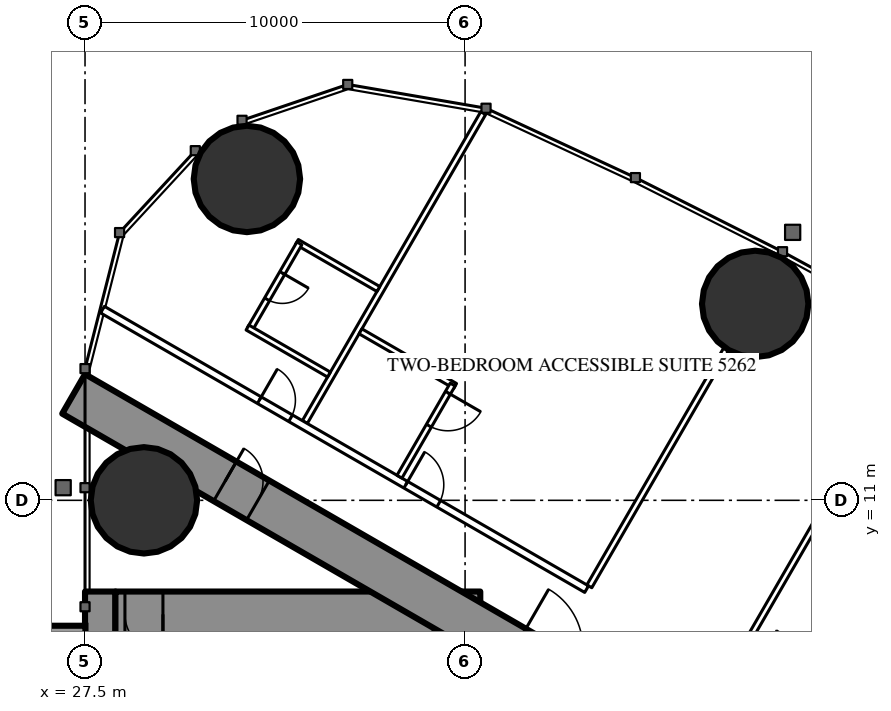
"""IFC4 building model, lengths in metres.
Left out: names, types, materials, properties, quantities, classifications, styles, units other than length and angle.
Written with IfcOpenShell. Run it as: python <this file> out.ifc"""

import sys

from ifc_helpers import new_model, si_unit, direction, frame, frame_2d, origin, origin_2d, place, context, subcontext, project, spatial, rectangle, circle, extrude, element, fill, save


model = new_model("IFC4")
c1 = context("Model", 3, precision=1e-05, world=origin(), true_north=direction((0.0, 1.0)))
c2 = subcontext(c1, "Body", "Model", "MODEL_VIEW")
j1 = project(units=[si_unit("LENGTHUNIT", "METRE"), si_unit("PLANEANGLEUNIT", "RADIAN")], contexts=[c1])
p1 = place(None, origin())
s1 = spatial("IfcSite", under=j1, at=p1, CompositionType="ELEMENT")
p2 = place(p1, origin())
s2 = spatial("IfcBuilding", under=s1, at=p2, CompositionType="ELEMENT")
p3 = place(p2, frame((0.0, 0.0, 194.8)))
s3 = spatial("IfcBuildingStorey", under=s2, at=p3, CompositionType="ELEMENT", Elevation=194.8)
for number, where, z_axis, x_axis in (
    (1, (31.76, 19.456, 0.0), (0.0, 0.0, 1.0), (1.0, 0.0, 0.0)),
    (2, (29.05, 11.0, 0.0), (0.0, 0.0, 1.0), (1.0, 0.0, 0.0)),
    (3, (45.134, 16.168, 0.0), (0.0, 0.0, 1.0), (1.0, 0.0, 0.0)),
):
    element("IfcColumn", number, at=place(p3, frame(where, z_axis=z_axis, x_axis=x_axis)), inside=s3, PredefinedType="COLUMN", context=c2, shape_type="SweptSolid", body=[
        extrude(circle(Radius=1.4, at=origin_2d()), origin(), (0.0, 0.0, 1.0), 3.5),
    ])
p4 = place(p3, frame((27.9, -8.6, 0.0), z_axis=(0.0, 0.0, 1.0), x_axis=(0.0, 1.0, 0.0)))
e4 = element("IfcWall", 4, at=p4, inside=s3, PredefinedType="SHEAR", context=c2, shape_type="SweptSolid", body=[
    extrude(rectangle(XDim=17.2, YDim=0.8, at=frame_2d((8.6, 0.0))), origin(), (0.0, 0.0, 1.0), 3.5),
])
p5 = place(p4, frame((2.45, 0.0, 0.6)))
e5 = element("IfcOpeningElement", 5, at=p5, cuts=e4, PredefinedType="OPENING", context=c2, shape_type="SweptSolid", body=[
    extrude(rectangle(XDim=0.6, YDim=2.1, at=frame_2d((0.3, 1.05))), frame((0.0, 0.41, 0.0), z_axis=(0.0, -1.0, 0.0), x_axis=(1.0, 0.0, 0.0)), (0.0, 0.0, 1.0), 0.82),
])
p6 = place(p4, frame((14.15, 0.0, 0.6)))
e6 = element("IfcOpeningElement", 6, at=p6, cuts=e4, PredefinedType="OPENING", context=c2, shape_type="SweptSolid", body=[
    extrude(rectangle(XDim=0.6, YDim=2.1, at=frame_2d((0.3, 1.05))), frame((0.0, 0.41, 0.0), z_axis=(0.0, -1.0, 0.0), x_axis=(1.0, 0.0, 0.0)), (0.0, 0.0, 1.0), 0.82),
])
p7 = place(p3, frame((37.3, -8.6, 0.0), z_axis=(0.0, 0.0, 1.0), x_axis=(0.0, 1.0, 0.0)))
e7 = element("IfcWall", 7, at=p7, inside=s3, PredefinedType="SHEAR", context=c2, shape_type="SweptSolid", body=[
    extrude(rectangle(XDim=17.2, YDim=1.2, at=frame_2d((8.6, 0.0))), origin(), (0.0, 0.0, 1.0), 3.5),
])
p8 = place(p7, frame((7.7, 0.0, 0.0)))
e8 = element("IfcOpeningElement", 8, at=p8, cuts=e7, PredefinedType="OPENING", context=c2, shape_type="SweptSolid", body=[
    extrude(rectangle(XDim=1.8, YDim=2.2, at=frame_2d((0.9, 1.1))), frame((0.0, 0.61, 0.0), z_axis=(0.0, -1.0, 0.0), x_axis=(1.0, 0.0, 0.0)), (0.0, 0.0, 1.0), 1.22),
])
p9 = place(p3, frame((28.3, 8.0, 0.0), z_axis=(0.0, 0.0, 1.0), x_axis=(1.0, 0.0, 0.0)))
e9 = element("IfcWall", 9, at=p9, inside=s3, PredefinedType="SHEAR", context=c2, shape_type="SweptSolid", body=[
    extrude(rectangle(XDim=8.4, YDim=1.2, at=frame_2d((4.2, 0.0))), origin(), (0.0, 0.0, 1.0), 3.5),
])
p10 = place(p9, frame((0.25, 0.0, 0.0)))
e10 = element("IfcOpeningElement", 10, at=p10, cuts=e9, PredefinedType="OPENING", context=c2, shape_type="SweptSolid", body=[
    extrude(rectangle(XDim=1.0, YDim=2.2, at=frame_2d((0.5, 1.1))), frame((0.0, 0.61, 0.0), z_axis=(0.0, -1.0, 0.0), x_axis=(1.0, 0.0, 0.0)), (0.0, 0.0, 1.0), 1.22),
])
p11 = place(p3, frame((27.2, 13.8, 0.0), z_axis=(0.0, 0.0, 1.0), x_axis=(0.866024515034, -0.500001539357, 0.0)))
e11 = element("IfcWall", 11, at=p11, inside=s3, PredefinedType="SHEAR", context=c2, shape_type="SweptSolid", body=[
    extrude(rectangle(XDim=26.907, YDim=1.2, at=frame_2d((13.454, 0.0))), origin(), (0.0, 0.0, 1.0), 3.5),
])
p12 = place(p11, frame((4.6, 0.0, 0.0)))
e12 = element("IfcOpeningElement", 12, at=p12, cuts=e11, PredefinedType="OPENING", context=c2, shape_type="SweptSolid", body=[
    extrude(rectangle(XDim=1.0, YDim=2.2, at=frame_2d((0.5, 1.1))), frame((0.0, 0.61, 0.0), z_axis=(0.0, -1.0, 0.0), x_axis=(1.0, 0.0, 0.0)), (0.0, 0.0, 1.0), 1.22),
])
p13 = place(p11, frame((13.395, 0.0, 0.0)))
e13 = element("IfcOpeningElement", 13, at=p13, cuts=e11, PredefinedType="OPENING", context=c2, shape_type="SweptSolid", body=[
    extrude(rectangle(XDim=1.8, YDim=2.2, at=frame_2d((0.9, 1.1))), frame((0.0, 0.61, 0.0), z_axis=(0.0, -1.0, 0.0), x_axis=(1.0, 0.0, 0.0)), (0.0, 0.0, 1.0), 1.22),
])
p14 = place(p3, frame((33.284, 13.059, 0.0), z_axis=(0.0, 0.0, 1.0), x_axis=(0.499985904184, 0.866033541855, 0.0)))
e14 = element("IfcWall", 14, at=p14, inside=s3, PredefinedType="PARTITIONING", context=c2, shape_type="SweptSolid", body=[
    extrude(rectangle(XDim=9.385, YDim=0.15, at=frame_2d((4.693, 0.0))), origin(), (0.0, 0.0, 1.0), 3.25),
])
p15 = place(p3, frame((40.769, 8.737, 0.0), z_axis=(0.0, 0.0, 1.0), x_axis=(0.500013115284, 0.866017831539, 0.0)))
e15 = element("IfcWall", 15, at=p15, inside=s3, PredefinedType="PARTITIONING", context=c2, shape_type="SweptSolid", body=[
    extrude(rectangle(XDim=7.198, YDim=0.15, at=frame_2d((3.599, 0.0))), origin(), (0.0, 0.0, 1.0), 2.3),
])
p16 = place(p3, frame((44.521, 6.571, 0.0), z_axis=(0.0, 0.0, 1.0), x_axis=(0.500020376429, 0.866013639128, 0.0)))
e16 = element("IfcWall", 16, at=p16, inside=s3, PredefinedType="PARTITIONING", context=c2, shape_type="SweptSolid", body=[
    extrude(rectangle(XDim=7.306, YDim=0.15, at=frame_2d((3.653, 0.0))), origin(), (0.0, 0.0, 1.0), 2.3),
])
p17 = place(p3, frame((27.959, 16.017, 0.0), z_axis=(0.0, 0.0, 1.0), x_axis=(0.866024165033, -0.500002145574, 0.0)))
e17 = element("IfcWall", 17, at=p17, inside=s3, PredefinedType="PARTITIONING", context=c2, shape_type="SweptSolid", body=[
    extrude(rectangle(XDim=14.709, YDim=0.2, at=frame_2d((7.354, 0.0))), origin(), (0.0, 0.0, 1.0), 3.25),
])
p18 = place(p17, frame((9.215, 0.0, 0.0)))
e18 = element("IfcOpeningElement", 18, at=p18, cuts=e17, PredefinedType="OPENING", context=c2, shape_type="SweptSolid", body=[
    extrude(rectangle(XDim=1.0, YDim=2.2, at=frame_2d((0.5, 1.1))), frame((0.0, 0.11, 0.0), z_axis=(0.0, -1.0, 0.0), x_axis=(1.0, 0.0, 0.0)), (0.0, 0.0, 1.0), 0.22),
])
p19 = place(p17, frame((4.765, 0.0, 0.0)))
e19 = element("IfcOpeningElement", 19, at=p19, cuts=e17, PredefinedType="OPENING", context=c2, shape_type="SweptSolid", body=[
    extrude(rectangle(XDim=0.95, YDim=2.2, at=frame_2d((0.475, 1.1))), frame((0.0, 0.11, 0.0), z_axis=(0.0, -1.0, 0.0), x_axis=(1.0, 0.0, 0.0)), (0.0, 0.0, 1.0), 0.22),
])
p20 = place(p3, frame((34.749, 15.446, 0.0), z_axis=(0.0, 0.0, 1.0), x_axis=(0.866018712932, -0.500011588718, 0.0)))
e20 = element("IfcWall", 20, at=p20, inside=s3, PredefinedType="PARTITIONING", context=c2, shape_type="SweptSolid", body=[
    extrude(rectangle(XDim=2.875, YDim=0.15, at=frame_2d((1.438, 0.0))), origin(), (0.0, 0.0, 1.0), 3.25),
])
p21 = place(p3, frame((35.773, 11.621, 0.0), z_axis=(0.0, 0.0, 1.0), x_axis=(0.49998411664, 0.866034573852, 0.0)))
e21 = element("IfcWall", 21, at=p21, inside=s3, PredefinedType="PARTITIONING", context=c2, shape_type="SweptSolid", body=[
    extrude(rectangle(XDim=2.8, YDim=0.15, at=frame_2d((1.4, 0.0))), origin(), (0.0, 0.0, 1.0), 3.25),
])
p22 = place(p21, frame((1.55, 0.0, 0.0)))
e22 = element("IfcOpeningElement", 22, at=p22, cuts=e21, PredefinedType="OPENING", context=c2, shape_type="SweptSolid", body=[
    extrude(rectangle(XDim=1.0, YDim=2.2, at=frame_2d((0.5, 1.1))), frame((0.0, 0.085, 0.0), z_axis=(0.0, -1.0, 0.0), x_axis=(1.0, 0.0, 0.0)), (0.0, 0.0, 1.0), 0.17),
])
p23 = place(p3, frame((33.075, 17.798, 0.0), z_axis=(0.0, 0.0, 1.0), x_axis=(0.866006523861, -0.500032699561, 0.0)))
e23 = element("IfcWall", 23, at=p23, inside=s3, PredefinedType="PARTITIONING", context=c2, shape_type="SweptSolid", body=[
    extrude(rectangle(XDim=2.475, YDim=0.15, at=frame_2d((1.237, 0.0))), origin(), (0.0, 0.0, 1.0), 3.25),
])
p24 = place(p3, frame((31.84, 15.509, 0.0), z_axis=(0.0, 0.0, 1.0), x_axis=(0.500006934395, 0.866021400173, 0.0)))
e24 = element("IfcWall", 24, at=p24, inside=s3, PredefinedType="PARTITIONING", context=c2, shape_type="SweptSolid", body=[
    extrude(rectangle(XDim=2.6, YDim=0.15, at=frame_2d((1.3, 0.0))), origin(), (0.0, 0.0, 1.0), 3.25),
])
p25 = place(p24, frame((0.9, 0.0, 0.0)))
e25 = element("IfcOpeningElement", 25, at=p25, cuts=e24, PredefinedType="OPENING", context=c2, shape_type="SweptSolid", body=[
    extrude(rectangle(XDim=0.8, YDim=2.2, at=frame_2d((0.4, 1.1))), frame((0.0, 0.085, 0.0), z_axis=(0.0, -1.0, 0.0), x_axis=(1.0, 0.0, 0.0)), (0.0, 0.0, 1.0), 0.17),
])
p26 = place(p3, frame((31.775, 15.546, 0.0), z_axis=(0.0, 0.0, 1.0), x_axis=(0.866031185235, -0.4999899861, 0.0)))
e26 = element("IfcWall", 26, at=p26, inside=s3, PredefinedType="PARTITIONING", context=c2, shape_type="SweptSolid", body=[
    extrude(rectangle(XDim=2.475, YDim=0.15, at=frame_2d((1.238, 0.0))), origin(), (0.0, 0.0, 1.0), 3.25),
])
p27 = place(p22, origin())
e27 = element("IfcDoor", 27, at=p27, inside=s3, OperationType="SINGLE_SWING_RIGHT", PredefinedType="DOOR", context=c2, shape_type="SweptSolid", body=[
    extrude(rectangle(XDim=1.0, YDim=2.2, at=frame_2d((0.5, 1.1))), frame((0.0, 0.025, 0.0), z_axis=(0.0, -1.0, 0.0), x_axis=(1.0, 0.0, 0.0)), (0.0, 0.0, 1.0), 0.05),
])
fill(e22, e27)
p28 = place(p18, origin())
e28 = element("IfcDoor", 28, at=p28, inside=s3, OperationType="SINGLE_SWING_LEFT", PredefinedType="DOOR", context=c2, shape_type="SweptSolid", body=[
    extrude(rectangle(XDim=1.0, YDim=2.2, at=frame_2d((0.5, 1.1))), frame((0.0, 0.025, 0.0), z_axis=(0.0, -1.0, 0.0), x_axis=(1.0, 0.0, 0.0)), (0.0, 0.0, 1.0), 0.05),
])
fill(e18, e28)
p29 = place(p25, origin())
e29 = element("IfcDoor", 29, at=p29, inside=s3, OperationType="SINGLE_SWING_RIGHT", PredefinedType="DOOR", context=c2, shape_type="SweptSolid", body=[
    extrude(rectangle(XDim=0.8, YDim=2.2, at=frame_2d((0.4, 1.1))), frame((0.0, 0.025, 0.0), z_axis=(0.0, -1.0, 0.0), x_axis=(1.0, 0.0, 0.0)), (0.0, 0.0, 1.0), 0.05),
])
fill(e25, e29)
p30 = place(p19, origin())
e30 = element("IfcDoor", 30, at=p30, inside=s3, OperationType="SINGLE_SWING_LEFT", PredefinedType="DOOR", context=c2, shape_type="SweptSolid", body=[
    extrude(rectangle(XDim=0.95, YDim=2.2, at=frame_2d((0.475, 1.1))), frame((0.0, 0.025, 0.0), z_axis=(0.0, -1.0, 0.0), x_axis=(1.0, 0.0, 0.0)), (0.0, 0.0, 1.0), 0.05),
])
fill(e19, e30)
p31 = place(p12, origin())
e31 = element("IfcDoor", 31, at=p31, inside=s3, OperationType="SINGLE_SWING_LEFT", PredefinedType="DOOR", context=c2, shape_type="SweptSolid", body=[
    extrude(rectangle(XDim=1.0, YDim=2.2, at=frame_2d((0.5, 1.1))), frame((0.0, 0.025, 0.0), z_axis=(0.0, -1.0, 0.0), x_axis=(1.0, 0.0, 0.0)), (0.0, 0.0, 1.0), 0.05),
])
fill(e12, e31)
p32 = place(p10, origin())
e32 = element("IfcDoor", 32, at=p32, inside=s3, OperationType="SINGLE_SWING_RIGHT", PredefinedType="DOOR", context=c2, shape_type="SweptSolid", body=[
    extrude(rectangle(XDim=1.0, YDim=2.2, at=frame_2d((0.5, 1.1))), frame((0.0, 0.025, 0.0), z_axis=(0.0, -1.0, 0.0), x_axis=(1.0, 0.0, 0.0)), (0.0, 0.0, 1.0), 0.05),
])
fill(e10, e32)
save(model, sys.argv[1])
